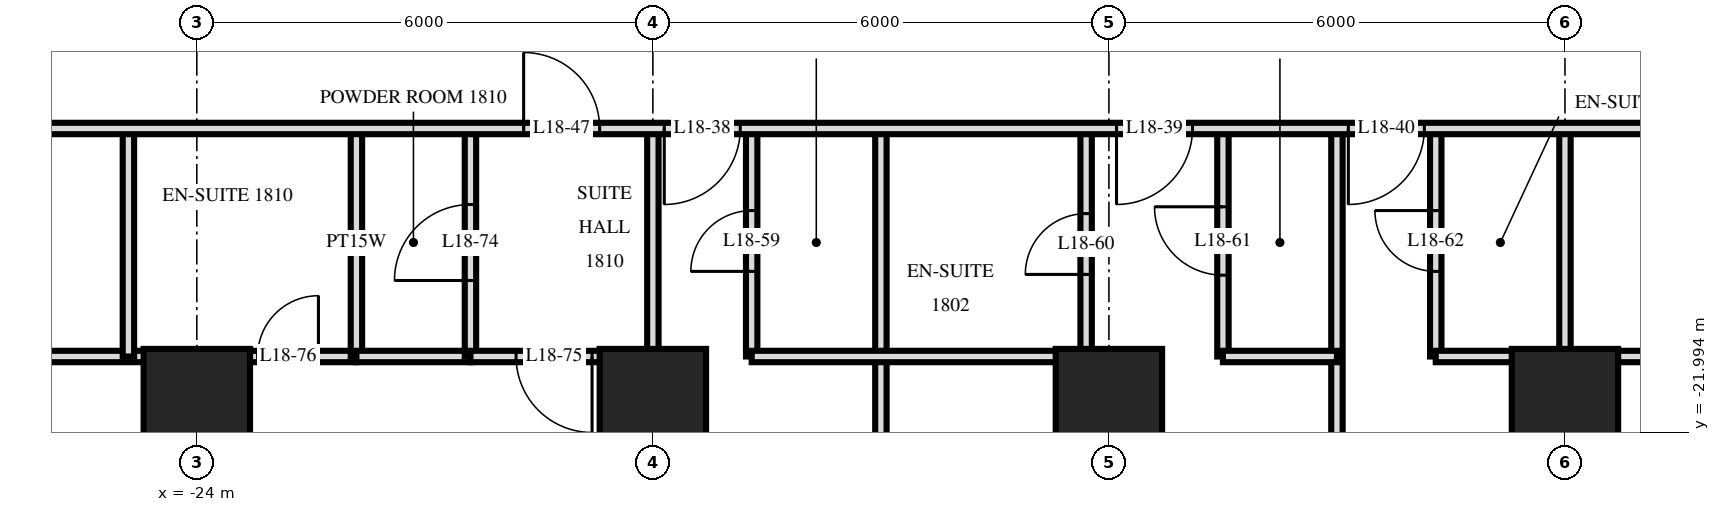
"""IFC4 building model, lengths in metres.
Left out: names, types, materials, properties, quantities, classifications, styles, units other than length and angle.
Written with IfcOpenShell. Run it as: python <this file> out.ifc"""

import sys

from ifc_helpers import new_model, si_unit, direction, frame, frame_2d, origin, origin_2d, place, context, subcontext, project, spatial, rectangle, extrude, element, fill, save


model = new_model("IFC4")
c1 = context("Model", 3, precision=1e-05, world=origin(), true_north=direction((0.0, 1.0)))
c2 = subcontext(c1, "Body", "Model", "MODEL_VIEW")
j1 = project(units=[si_unit("LENGTHUNIT", "METRE"), si_unit("PLANEANGLEUNIT", "RADIAN")], contexts=[c1])
p1 = place(None, origin())
s1 = spatial("IfcSite", under=j1, at=p1, CompositionType="ELEMENT")
p2 = place(p1, origin())
s2 = spatial("IfcBuilding", under=s1, at=p2, CompositionType="ELEMENT")
p3 = place(p2, frame((0.0, 0.0, 74.4)))
s3 = spatial("IfcBuildingStorey", under=s2, at=p3, CompositionType="ELEMENT", Elevation=74.4)
for number, where, z_axis, x_axis in (
    (1, (-24.0, -21.6, 0.0), (0.0, 0.0, 1.0), (1.0, 0.0, 0.0)),
    (2, (-18.0, -21.6, 0.0), (0.0, 0.0, 1.0), (1.0, 0.0, 0.0)),
    (3, (-12.0, -21.6, 0.0), (0.0, 0.0, 1.0), (1.0, 0.0, 0.0)),
    (4, (-6.0, -21.6, 0.0), (0.0, 0.0, 1.0), (1.0, 0.0, 0.0)),
):
    element("IfcColumn", number, at=place(p3, frame(where, z_axis=z_axis, x_axis=x_axis)), inside=s3, PredefinedType="COLUMN", context=c2, shape_type="SweptSolid", body=[
        extrude(rectangle(XDim=1.4, YDim=1.4, at=origin_2d()), origin(), (0.0, 0.0, 1.0), 3.6),
    ])
p4 = place(p3, frame((-6.0, -29.22, 0.0), z_axis=(0.0, 0.0, 1.0), x_axis=(0.0, 1.0, 0.0)))
e5 = element("IfcWall", 5, at=p4, inside=s3, PredefinedType="PARTITIONING", context=c2, shape_type="SweptSolid", body=[
    extrude(rectangle(XDim=11.22, YDim=0.15, at=frame_2d((5.61, 0.0))), origin(), (0.0, 0.0, 1.0), 3.32),
])
p5 = place(p3, frame((-7.7, -21.0, 0.0), z_axis=(0.0, 0.0, 1.0), x_axis=(0.0, 1.0, 0.0)))
e6 = element("IfcWall", 6, at=p5, inside=s3, PredefinedType="PARTITIONING", context=c2, shape_type="SweptSolid", body=[
    extrude(rectangle(XDim=3.0, YDim=0.15, at=frame_2d((1.5, 0.0))), origin(), (0.0, 0.0, 1.0), 3.32),
])
p6 = place(p5, frame((1.12, 0.0, 0.0)))
e7 = element("IfcOpeningElement", 7, at=p6, cuts=e6, PredefinedType="OPENING", context=c2, shape_type="SweptSolid", body=[
    extrude(rectangle(XDim=0.8, YDim=2.1, at=frame_2d((0.4, 1.05))), frame((0.0, 0.085, 0.0), z_axis=(0.0, -1.0, 0.0), x_axis=(1.0, 0.0, 0.0)), (0.0, 0.0, 1.0), 0.17),
])
p7 = place(p3, frame((-9.0, -29.22, 0.0), z_axis=(0.0, 0.0, 1.0), x_axis=(0.0, 1.0, 0.0)))
e8 = element("IfcWall", 8, at=p7, inside=s3, PredefinedType="PARTITIONING", context=c2, shape_type="SweptSolid", body=[
    extrude(rectangle(XDim=11.22, YDim=0.15, at=frame_2d((5.61, 0.0))), origin(), (0.0, 0.0, 1.0), 3.32),
])
p8 = place(p3, frame((-10.5, -21.0, 0.0), z_axis=(0.0, 0.0, 1.0), x_axis=(0.0, 1.0, 0.0)))
e9 = element("IfcWall", 9, at=p8, inside=s3, PredefinedType="PARTITIONING", context=c2, shape_type="SweptSolid", body=[
    extrude(rectangle(XDim=3.0, YDim=0.15, at=frame_2d((1.5, 0.0))), origin(), (0.0, 0.0, 1.0), 3.32),
])
p9 = place(p8, frame((1.07, 0.0, 0.0)))
e10 = element("IfcOpeningElement", 10, at=p9, cuts=e9, PredefinedType="OPENING", context=c2, shape_type="SweptSolid", body=[
    extrude(rectangle(XDim=0.9, YDim=2.1, at=frame_2d((0.45, 1.05))), frame((0.0, 0.085, 0.0), z_axis=(0.0, -1.0, 0.0), x_axis=(1.0, 0.0, 0.0)), (0.0, 0.0, 1.0), 0.17),
])
p10 = place(p3, frame((-12.3, -21.0, 0.0), z_axis=(0.0, 0.0, 1.0), x_axis=(0.0, 1.0, 0.0)))
e11 = element("IfcWall", 11, at=p10, inside=s3, PredefinedType="PARTITIONING", context=c2, shape_type="SweptSolid", body=[
    extrude(rectangle(XDim=3.0, YDim=0.15, at=frame_2d((1.5, 0.0))), origin(), (0.0, 0.0, 1.0), 3.32),
])
p11 = place(p10, frame((1.08, 0.0, 0.0)))
e12 = element("IfcOpeningElement", 12, at=p11, cuts=e11, PredefinedType="OPENING", context=c2, shape_type="SweptSolid", body=[
    extrude(rectangle(XDim=0.8, YDim=2.1, at=frame_2d((0.4, 1.05))), frame((0.0, 0.085, 0.0), z_axis=(0.0, -1.0, 0.0), x_axis=(1.0, 0.0, 0.0)), (0.0, 0.0, 1.0), 0.17),
])
p12 = place(p3, frame((-15.0, -29.22, 0.0), z_axis=(0.0, 0.0, 1.0), x_axis=(0.0, 1.0, 0.0)))
e13 = element("IfcWall", 13, at=p12, inside=s3, PredefinedType="PARTITIONING", context=c2, shape_type="SweptSolid", body=[
    extrude(rectangle(XDim=11.22, YDim=0.15, at=frame_2d((5.61, 0.0))), origin(), (0.0, 0.0, 1.0), 3.32),
])
p13 = place(p3, frame((-16.7, -21.0, 0.0), z_axis=(0.0, 0.0, 1.0), x_axis=(0.0, 1.0, 0.0)))
e14 = element("IfcWall", 14, at=p13, inside=s3, PredefinedType="PARTITIONING", context=c2, shape_type="SweptSolid", body=[
    extrude(rectangle(XDim=3.0, YDim=0.15, at=frame_2d((1.5, 0.0))), origin(), (0.0, 0.0, 1.0), 3.32),
])
p14 = place(p13, frame((1.12, 0.0, 0.0)))
e15 = element("IfcOpeningElement", 15, at=p14, cuts=e14, PredefinedType="OPENING", context=c2, shape_type="SweptSolid", body=[
    extrude(rectangle(XDim=0.8, YDim=2.1, at=frame_2d((0.4, 1.05))), frame((0.0, 0.085, 0.0), z_axis=(0.0, -1.0, 0.0), x_axis=(1.0, 0.0, 0.0)), (0.0, 0.0, 1.0), 0.17),
])
p15 = place(p3, frame((-18.0, -21.0, 0.0), z_axis=(0.0, 0.0, 1.0), x_axis=(0.0, 1.0, 0.0)))
e16 = element("IfcWall", 16, at=p15, inside=s3, PredefinedType="PARTITIONING", context=c2, shape_type="SweptSolid", body=[
    extrude(rectangle(XDim=3.0, YDim=0.15, at=frame_2d((1.5, 0.0))), origin(), (0.0, 0.0, 1.0), 3.32),
])
p16 = place(p3, frame((-18.0, -29.22, 0.0), z_axis=(0.0, 0.0, 1.0), x_axis=(0.0, 1.0, 0.0)))
e17 = element("IfcWall", 17, at=p16, inside=s3, PredefinedType="PARTITIONING", context=c2, shape_type="SweptSolid", body=[
    extrude(rectangle(XDim=8.22, YDim=0.15, at=frame_2d((4.11, 0.0))), origin(), (0.0, 0.0, 1.0), 3.32),
])
p17 = place(p3, frame((-20.4, -21.0, 0.0), z_axis=(0.0, 0.0, 1.0), x_axis=(0.0, 1.0, 0.0)))
e18 = element("IfcWall", 18, at=p17, inside=s3, PredefinedType="PARTITIONING", context=c2, shape_type="SweptSolid", body=[
    extrude(rectangle(XDim=3.0, YDim=0.15, at=frame_2d((1.5, 0.0))), origin(), (0.0, 0.0, 1.0), 3.32),
])
p18 = place(p17, frame((1.0, 0.0, 0.0)))
e19 = element("IfcOpeningElement", 19, at=p18, cuts=e18, PredefinedType="OPENING", context=c2, shape_type="SweptSolid", body=[
    extrude(rectangle(XDim=1.0, YDim=2.1, at=frame_2d((0.5, 1.05))), frame((0.0, 0.085, 0.0), z_axis=(0.0, -1.0, 0.0), x_axis=(1.0, 0.0, 0.0)), (0.0, 0.0, 1.0), 0.17),
])
p19 = place(p3, frame((-21.9, -21.0, 0.0), z_axis=(0.0, 0.0, 1.0), x_axis=(0.0, 1.0, 0.0)))
e20 = element("IfcWall", 20, at=p19, inside=s3, PredefinedType="PLUMBINGWALL", context=c2, shape_type="SweptSolid", body=[
    extrude(rectangle(XDim=3.0, YDim=0.15, at=frame_2d((1.5, 0.0))), origin(), (0.0, 0.0, 1.0), 3.32),
])
p20 = place(p3, frame((-24.0, -29.22, 0.0), z_axis=(0.0, 0.0, 1.0), x_axis=(0.0, 1.0, 0.0)))
e21 = element("IfcWall", 21, at=p20, inside=s3, PredefinedType="PARTITIONING", context=c2, shape_type="SweptSolid", body=[
    extrude(rectangle(XDim=8.22, YDim=0.15, at=frame_2d((4.11, 0.0))), origin(), (0.0, 0.0, 1.0), 3.32),
])
p21 = place(p20, frame((3.59, 0.0, 0.0)))
e22 = element("IfcOpeningElement", 22, at=p21, cuts=e21, PredefinedType="OPENING", context=c2, shape_type="SweptSolid", body=[
    extrude(rectangle(XDim=0.9, YDim=2.1, at=frame_2d((0.45, 1.05))), frame((0.0, 0.085, 0.0), z_axis=(0.0, -1.0, 0.0), x_axis=(1.0, 0.0, 0.0)), (0.0, 0.0, 1.0), 0.17),
])
p22 = place(p3, frame((-24.9, -21.0, 0.0), z_axis=(0.0, 0.0, 1.0), x_axis=(0.0, 1.0, 0.0)))
e23 = element("IfcWall", 23, at=p22, inside=s3, PredefinedType="PARTITIONING", context=c2, shape_type="SweptSolid", body=[
    extrude(rectangle(XDim=3.0, YDim=0.15, at=frame_2d((1.5, 0.0))), origin(), (0.0, 0.0, 1.0), 3.32),
])
p23 = place(p3, frame((-20.4, -21.0, 0.0), z_axis=(0.0, 0.0, 1.0), x_axis=(1.0, 0.0, 0.0)))
e24 = element("IfcWall", 24, at=p23, inside=s3, PredefinedType="PARTITIONING", context=c2, shape_type="SweptSolid", body=[
    extrude(rectangle(XDim=2.4, YDim=0.15, at=frame_2d((1.2, 0.0))), origin(), (0.0, 0.0, 1.0), 3.32),
])
p24 = place(p23, frame((0.6, 0.0, 0.0)))
e25 = element("IfcOpeningElement", 25, at=p24, cuts=e24, PredefinedType="OPENING", context=c2, shape_type="SweptSolid", body=[
    extrude(rectangle(XDim=1.0, YDim=2.1, at=frame_2d((0.5, 1.05))), frame((0.0, 0.085, 0.0), z_axis=(0.0, -1.0, 0.0), x_axis=(1.0, 0.0, 0.0)), (0.0, 0.0, 1.0), 0.17),
])
p25 = place(p3, frame((-33.12, -21.0, 0.0), z_axis=(0.0, 0.0, 1.0), x_axis=(1.0, 0.0, 0.0)))
e26 = element("IfcWall", 26, at=p25, inside=s3, PredefinedType="PARTITIONING", context=c2, shape_type="SweptSolid", body=[
    extrude(rectangle(XDim=11.22, YDim=0.15, at=frame_2d((5.61, 0.0))), origin(), (0.0, 0.0, 1.0), 3.32),
])
p26 = place(p25, frame((9.92, 0.0, 0.0)))
e27 = element("IfcOpeningElement", 27, at=p26, cuts=e26, PredefinedType="OPENING", context=c2, shape_type="SweptSolid", body=[
    extrude(rectangle(XDim=0.8, YDim=2.1, at=frame_2d((0.4, 1.05))), frame((0.0, 0.085, 0.0), z_axis=(0.0, -1.0, 0.0), x_axis=(1.0, 0.0, 0.0)), (0.0, 0.0, 1.0), 0.17),
])
p27 = place(p25, frame((3.92, 0.0, 0.0)))
e28 = element("IfcOpeningElement", 28, at=p27, cuts=e26, PredefinedType="OPENING", context=c2, shape_type="SweptSolid", body=[
    extrude(rectangle(XDim=0.9, YDim=2.1, at=frame_2d((0.45, 1.05))), frame((0.0, 0.085, 0.0), z_axis=(0.0, -1.0, 0.0), x_axis=(1.0, 0.0, 0.0)), (0.0, 0.0, 1.0), 0.17),
])
p28 = place(p3, frame((-16.7, -21.0, 0.0), z_axis=(0.0, 0.0, 1.0), x_axis=(1.0, 0.0, 0.0)))
e29 = element("IfcWall", 29, at=p28, inside=s3, PredefinedType="PARTITIONING", context=c2, shape_type="SweptSolid", body=[
    extrude(rectangle(XDim=4.4, YDim=0.15, at=frame_2d((2.2, 0.0))), origin(), (0.0, 0.0, 1.0), 3.32),
])
p29 = place(p3, frame((-10.5, -21.0, 0.0), z_axis=(0.0, 0.0, 1.0), x_axis=(1.0, 0.0, 0.0)))
e30 = element("IfcWall", 30, at=p29, inside=s3, PredefinedType="PARTITIONING", context=c2, shape_type="SweptSolid", body=[
    extrude(rectangle(XDim=1.5, YDim=0.15, at=frame_2d((0.75, 0.0))), origin(), (0.0, 0.0, 1.0), 3.32),
])
p30 = place(p3, frame((-7.7, -21.0, 0.0), z_axis=(0.0, 0.0, 1.0), x_axis=(1.0, 0.0, 0.0)))
e31 = element("IfcWall", 31, at=p30, inside=s3, PredefinedType="PARTITIONING", context=c2, shape_type="SweptSolid", body=[
    extrude(rectangle(XDim=4.4, YDim=0.15, at=frame_2d((2.2, 0.0))), origin(), (0.0, 0.0, 1.0), 3.32),
])
p31 = place(p3, frame((-21.9, -21.0, 0.0), z_axis=(0.0, 0.0, 1.0), x_axis=(1.0, 0.0, 0.0)))
e32 = element("IfcWall", 32, at=p31, inside=s3, PredefinedType="PLUMBINGWALL", context=c2, shape_type="SweptSolid", body=[
    extrude(rectangle(XDim=1.5, YDim=0.15, at=frame_2d((0.75, 0.0))), origin(), (0.0, 0.0, 1.0), 3.32),
])
p32 = place(p3, frame((-33.12, -18.0, 0.0), z_axis=(0.0, 0.0, 1.0), x_axis=(1.0, 0.0, 0.0)))
e33 = element("IfcWall", 33, at=p32, inside=s3, PredefinedType="PARTITIONING", context=c2, shape_type="SweptSolid", body=[
    extrude(rectangle(XDim=66.24, YDim=0.15, at=frame_2d((33.12, 0.0))), origin(), (0.0, 0.0, 1.0), 3.32),
])
p33 = place(p32, frame((15.27, 0.0, 0.0)))
e34 = element("IfcOpeningElement", 34, at=p33, cuts=e33, PredefinedType="OPENING", context=c2, shape_type="SweptSolid", body=[
    extrude(rectangle(XDim=1.0, YDim=2.1, at=frame_2d((0.5, 1.05))), frame((0.0, 0.085, 0.0), z_axis=(0.0, -1.0, 0.0), x_axis=(1.0, 0.0, 0.0)), (0.0, 0.0, 1.0), 0.17),
])
p34 = place(p32, frame((21.22, 0.0, 0.0)))
e35 = element("IfcOpeningElement", 35, at=p34, cuts=e33, PredefinedType="OPENING", context=c2, shape_type="SweptSolid", body=[
    extrude(rectangle(XDim=1.0, YDim=2.1, at=frame_2d((0.5, 1.05))), frame((0.0, 0.085, 0.0), z_axis=(0.0, -1.0, 0.0), x_axis=(1.0, 0.0, 0.0)), (0.0, 0.0, 1.0), 0.17),
])
p35 = place(p32, frame((24.27, 0.0, 0.0)))
e36 = element("IfcOpeningElement", 36, at=p35, cuts=e33, PredefinedType="OPENING", context=c2, shape_type="SweptSolid", body=[
    extrude(rectangle(XDim=1.0, YDim=2.1, at=frame_2d((0.5, 1.05))), frame((0.0, 0.085, 0.0), z_axis=(0.0, -1.0, 0.0), x_axis=(1.0, 0.0, 0.0)), (0.0, 0.0, 1.0), 0.17),
])
p36 = place(p32, frame((30.97, 0.0, 0.0)))
e37 = element("IfcOpeningElement", 37, at=p36, cuts=e33, PredefinedType="OPENING", context=c2, shape_type="SweptSolid", body=[
    extrude(rectangle(XDim=1.0, YDim=2.1, at=frame_2d((0.5, 1.05))), frame((0.0, 0.085, 0.0), z_axis=(0.0, -1.0, 0.0), x_axis=(1.0, 0.0, 0.0)), (0.0, 0.0, 1.0), 0.17),
])
p37 = place(p32, frame((40.42, 0.0, 0.0)))
e38 = element("IfcOpeningElement", 38, at=p37, cuts=e33, PredefinedType="OPENING", context=c2, shape_type="SweptSolid", body=[
    extrude(rectangle(XDim=1.0, YDim=2.1, at=frame_2d((0.5, 1.05))), frame((0.0, 0.085, 0.0), z_axis=(0.0, -1.0, 0.0), x_axis=(1.0, 0.0, 0.0)), (0.0, 0.0, 1.0), 0.17),
])
p38 = place(p32, frame((43.97, 0.0, 0.0)))
e39 = element("IfcOpeningElement", 39, at=p38, cuts=e33, PredefinedType="OPENING", context=c2, shape_type="SweptSolid", body=[
    extrude(rectangle(XDim=1.0, YDim=2.1, at=frame_2d((0.5, 1.05))), frame((0.0, 0.085, 0.0), z_axis=(0.0, -1.0, 0.0), x_axis=(1.0, 0.0, 0.0)), (0.0, 0.0, 1.0), 0.17),
])
p39 = place(p32, frame((45.52, 0.0, 0.0)))
e40 = element("IfcOpeningElement", 40, at=p39, cuts=e33, PredefinedType="OPENING", context=c2, shape_type="SweptSolid", body=[
    extrude(rectangle(XDim=1.0, YDim=2.1, at=frame_2d((0.5, 1.05))), frame((0.0, 0.085, 0.0), z_axis=(0.0, -1.0, 0.0), x_axis=(1.0, 0.0, 0.0)), (0.0, 0.0, 1.0), 0.17),
])
p40 = place(p32, frame((52.97, 0.0, 0.0)))
e41 = element("IfcOpeningElement", 41, at=p40, cuts=e33, PredefinedType="OPENING", context=c2, shape_type="SweptSolid", body=[
    extrude(rectangle(XDim=1.0, YDim=2.1, at=frame_2d((0.5, 1.05))), frame((0.0, 0.085, 0.0), z_axis=(0.0, -1.0, 0.0), x_axis=(1.0, 0.0, 0.0)), (0.0, 0.0, 1.0), 0.17),
])
p41 = place(p32, frame((54.27, 0.0, 0.0)))
e42 = element("IfcOpeningElement", 42, at=p41, cuts=e33, PredefinedType="OPENING", context=c2, shape_type="SweptSolid", body=[
    extrude(rectangle(XDim=1.0, YDim=2.1, at=frame_2d((0.5, 1.05))), frame((0.0, 0.085, 0.0), z_axis=(0.0, -1.0, 0.0), x_axis=(1.0, 0.0, 0.0)), (0.0, 0.0, 1.0), 0.17),
])
p42 = place(p32, frame((13.42, 0.0, 0.0)))
e43 = element("IfcOpeningElement", 43, at=p42, cuts=e33, PredefinedType="OPENING", context=c2, shape_type="SweptSolid", body=[
    extrude(rectangle(XDim=1.0, YDim=2.1, at=frame_2d((0.5, 1.05))), frame((0.0, 0.085, 0.0), z_axis=(0.0, -1.0, 0.0), x_axis=(1.0, 0.0, 0.0)), (0.0, 0.0, 1.0), 0.17),
])
p43 = place(p32, frame((60.82, 0.0, 0.0)))
e44 = element("IfcOpeningElement", 44, at=p43, cuts=e33, PredefinedType="OPENING", context=c2, shape_type="SweptSolid", body=[
    extrude(rectangle(XDim=1.0, YDim=2.1, at=frame_2d((0.5, 1.05))), frame((0.0, 0.085, 0.0), z_axis=(0.0, -1.0, 0.0), x_axis=(1.0, 0.0, 0.0)), (0.0, 0.0, 1.0), 0.17),
])
p44 = place(p33, frame((0.5, 0.0, 0.0), z_axis=(0.0, 0.0, 1.0), x_axis=(-1.0, 0.0, 0.0)))
e45 = element("IfcDoor", 45, at=p44, inside=s3, OperationType="SINGLE_SWING_LEFT", PredefinedType="DOOR", context=c2, shape_type="SweptSolid", body=[
    extrude(rectangle(XDim=1.0, YDim=2.1, at=frame_2d((0.0, 1.05))), frame((0.0, -0.025, 0.0), z_axis=(0.0, 1.0, 0.0), x_axis=(-1.0, 0.0, 0.0)), (0.0, 0.0, 1.0), 0.05),
])
fill(e34, e45)
p45 = place(p34, frame((0.5, 0.0, 0.0), z_axis=(0.0, 0.0, 1.0), x_axis=(-1.0, 0.0, 0.0)))
e46 = element("IfcDoor", 46, at=p45, inside=s3, OperationType="SINGLE_SWING_LEFT", PredefinedType="DOOR", context=c2, shape_type="SweptSolid", body=[
    extrude(rectangle(XDim=1.0, YDim=2.1, at=frame_2d((0.0, 1.05))), frame((0.0, -0.025, 0.0), z_axis=(0.0, 1.0, 0.0), x_axis=(-1.0, 0.0, 0.0)), (0.0, 0.0, 1.0), 0.05),
])
fill(e35, e46)
p46 = place(p35, frame((0.5, 0.0, 0.0), z_axis=(0.0, 0.0, 1.0), x_axis=(-1.0, 0.0, 0.0)))
e47 = element("IfcDoor", 47, at=p46, inside=s3, OperationType="SINGLE_SWING_LEFT", PredefinedType="DOOR", context=c2, shape_type="SweptSolid", body=[
    extrude(rectangle(XDim=1.0, YDim=2.1, at=frame_2d((0.0, 1.05))), frame((0.0, -0.025, 0.0), z_axis=(0.0, 1.0, 0.0), x_axis=(-1.0, 0.0, 0.0)), (0.0, 0.0, 1.0), 0.05),
])
fill(e36, e47)
p47 = place(p42, origin())
e48 = element("IfcDoor", 48, at=p47, inside=s3, OperationType="SINGLE_SWING_RIGHT", PredefinedType="DOOR", context=c2, shape_type="SweptSolid", body=[
    extrude(rectangle(XDim=1.0, YDim=2.1, at=frame_2d((0.5, 1.05))), frame((0.0, 0.025, 0.0), z_axis=(0.0, -1.0, 0.0), x_axis=(1.0, 0.0, 0.0)), (0.0, 0.0, 1.0), 0.05),
])
fill(e43, e48)
p48 = place(p14, origin())
e49 = element("IfcDoor", 49, at=p48, inside=s3, OperationType="SINGLE_SWING_RIGHT", PredefinedType="DOOR", context=c2, shape_type="SweptSolid", body=[
    extrude(rectangle(XDim=0.8, YDim=2.1, at=frame_2d((0.4, 1.05))), frame((0.0, 0.025, 0.0), z_axis=(0.0, -1.0, 0.0), x_axis=(1.0, 0.0, 0.0)), (0.0, 0.0, 1.0), 0.05),
])
fill(e15, e49)
p49 = place(p11, origin())
e50 = element("IfcDoor", 50, at=p49, inside=s3, OperationType="SINGLE_SWING_RIGHT", PredefinedType="DOOR", context=c2, shape_type="SweptSolid", body=[
    extrude(rectangle(XDim=0.8, YDim=2.1, at=frame_2d((0.4, 1.05))), frame((0.0, 0.025, 0.0), z_axis=(0.0, -1.0, 0.0), x_axis=(1.0, 0.0, 0.0)), (0.0, 0.0, 1.0), 0.05),
])
fill(e12, e50)
p50 = place(p9, origin())
e51 = element("IfcDoor", 51, at=p50, inside=s3, OperationType="SINGLE_SWING_LEFT", PredefinedType="DOOR", context=c2, shape_type="SweptSolid", body=[
    extrude(rectangle(XDim=0.9, YDim=2.1, at=frame_2d((0.45, 1.05))), frame((0.0, 0.025, 0.0), z_axis=(0.0, -1.0, 0.0), x_axis=(1.0, 0.0, 0.0)), (0.0, 0.0, 1.0), 0.05),
])
fill(e10, e51)
p51 = place(p6, origin())
e52 = element("IfcDoor", 52, at=p51, inside=s3, OperationType="SINGLE_SWING_LEFT", PredefinedType="DOOR", context=c2, shape_type="SweptSolid", body=[
    extrude(rectangle(XDim=0.8, YDim=2.1, at=frame_2d((0.4, 1.05))), frame((0.0, 0.025, 0.0), z_axis=(0.0, -1.0, 0.0), x_axis=(1.0, 0.0, 0.0)), (0.0, 0.0, 1.0), 0.05),
])
fill(e7, e52)
p52 = place(p18, origin())
e53 = element("IfcDoor", 53, at=p52, inside=s3, OperationType="SINGLE_SWING_RIGHT", PredefinedType="DOOR", context=c2, shape_type="SweptSolid", body=[
    extrude(rectangle(XDim=1.0, YDim=2.1, at=frame_2d((0.5, 1.05))), frame((0.0, 0.025, 0.0), z_axis=(0.0, -1.0, 0.0), x_axis=(1.0, 0.0, 0.0)), (0.0, 0.0, 1.0), 0.05),
])
fill(e19, e53)
p53 = place(p24, frame((0.5, 0.0, 0.0), z_axis=(0.0, 0.0, 1.0), x_axis=(-1.0, 0.0, 0.0)))
e54 = element("IfcDoor", 54, at=p53, inside=s3, OperationType="SINGLE_SWING_RIGHT", PredefinedType="DOOR", context=c2, shape_type="SweptSolid", body=[
    extrude(rectangle(XDim=1.0, YDim=2.1, at=frame_2d((0.0, 1.05))), frame((0.0, -0.025, 0.0), z_axis=(0.0, 1.0, 0.0), x_axis=(-1.0, 0.0, 0.0)), (0.0, 0.0, 1.0), 0.05),
])
fill(e25, e54)
p54 = place(p26, origin())
e55 = element("IfcDoor", 55, at=p54, inside=s3, OperationType="SINGLE_SWING_LEFT", PredefinedType="DOOR", context=c2, shape_type="SweptSolid", body=[
    extrude(rectangle(XDim=0.8, YDim=2.1, at=frame_2d((0.4, 1.05))), frame((0.0, 0.025, 0.0), z_axis=(0.0, -1.0, 0.0), x_axis=(1.0, 0.0, 0.0)), (0.0, 0.0, 1.0), 0.05),
])
fill(e27, e55)
save(model, sys.argv[1])
